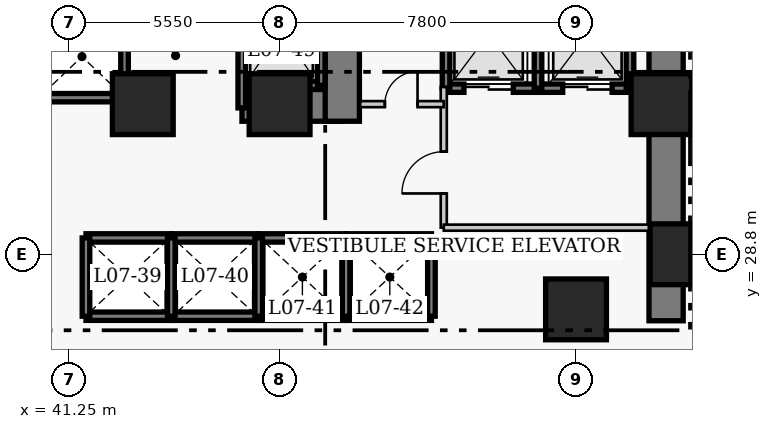
"""IFC4 building model, lengths in metres.
Left out: names, types, materials, properties, quantities, classifications, styles, units other than length and angle.
Written with IfcOpenShell. Run it as: python <this file> out.ifc"""

import sys

from ifc_helpers import new_model, si_unit, direction, frame, frame_2d, origin, origin_2d, place, context, subcontext, project, spatial, rectangle, extrude, element, fill, save


model = new_model("IFC4")
c1 = context("Model", 3, precision=1e-05, world=origin(), true_north=direction((0.0, 1.0)))
c2 = subcontext(c1, "Body", "Model", "MODEL_VIEW")
j1 = project(units=[si_unit("LENGTHUNIT", "METRE"), si_unit("PLANEANGLEUNIT", "RADIAN")], contexts=[c1])
p1 = place(None, origin())
s1 = spatial("IfcSite", under=j1, at=p1, CompositionType="ELEMENT")
p2 = place(p1, origin())
s2 = spatial("IfcBuilding", under=s1, at=p2, CompositionType="ELEMENT")
p3 = place(p2, frame((0.0, 0.0, 33.6)))
s3 = spatial("IfcBuildingStorey", under=s2, at=p3, CompositionType="ELEMENT", Elevation=33.6)
p4 = place(p3, frame((56.97, 27.05, 0.0), z_axis=(0.0, 0.0, 1.0), x_axis=(0.0, 1.0, 0.0)))
e1 = element("IfcWall", 1, at=p4, inside=s3, PredefinedType="SHEAR", context=c2, shape_type="SweptSolid", body=[
    extrude(rectangle(XDim=13.72, YDim=0.9, at=frame_2d((6.86, 0.0))), origin(), (0.0, 0.0, 1.0), 3.8),
])
p5 = place(p3, frame((45.81, 32.75, 0.0), z_axis=(0.0, 0.0, 1.0), x_axis=(1.0, 0.0, 0.0)))
e2 = element("IfcWall", 2, at=p5, inside=s3, PredefinedType="SHEAR", context=c2, shape_type="SweptSolid", body=[
    extrude(rectangle(XDim=2.64, YDim=0.9, at=frame_2d((1.32, 0.0))), origin(), (0.0, 0.0, 1.0), 3.8),
])
p6 = place(p3, frame((48.45, 32.3, 0.0), z_axis=(0.0, 0.0, 1.0), x_axis=(0.0, 1.0, 0.0)))
e3 = element("IfcWall", 3, at=p6, inside=s3, PredefinedType="SHEAR", context=c2, shape_type="SweptSolid", body=[
    extrude(rectangle(XDim=8.02, YDim=0.9, at=frame_2d((4.01, 0.0))), origin(), (0.0, 0.0, 1.0), 3.8),
])
p7 = place(p6, frame((5.9, 0.0, 0.0)))
e4 = element("IfcOpeningElement", 4, at=p7, cuts=e3, PredefinedType="OPENING", context=c2, shape_type="SweptSolid", body=[
    extrude(rectangle(XDim=1.1, YDim=2.15, at=frame_2d((0.55, 1.075))), frame((0.0, 0.46, 0.0), z_axis=(0.0, -1.0, 0.0), x_axis=(1.0, 0.0, 0.0)), (0.0, 0.0, 1.0), 0.92),
])
for number, where, z_axis, x_axis in (
    (5, (57.35, 28.8, 0.0), (0.0, 0.0, 1.0), (1.0, 0.0, 0.0)),
    (6, (43.2, 32.75, 0.0), (0.0, 0.0, 1.0), (1.0, 0.0, 0.0)),
    (7, (46.8, 32.75, 0.0), (0.0, 0.0, 1.0), (1.0, 0.0, 0.0)),
    (8, (54.6, 27.35, 0.0), (0.0, 0.0, 1.0), (1.0, 0.0, 0.0)),
    (9, (56.85, 32.75, 0.0), (0.0, 0.0, 1.0), (1.0, 0.0, 0.0)),
):
    element("IfcColumn", number, at=place(p3, frame(where, z_axis=z_axis, x_axis=x_axis)), inside=s3, PredefinedType="COLUMN", context=c2, shape_type="SweptSolid", body=[
        extrude(rectangle(XDim=1.6, YDim=1.6, at=origin_2d()), origin(), (0.0, 0.0, 1.0), 3.8),
    ])
for number, where, z_axis, x_axis in (
    (10, (41.705, 29.23, 0.0), (0.0, 0.0, 1.0), (1.0, 0.0, 0.0)),
    (11, (41.705, 27.17, 0.0), (0.0, 0.0, 1.0), (1.0, 0.0, 0.0)),
):
    element("IfcWall", number, at=place(p3, frame(where, z_axis=z_axis, x_axis=x_axis)), inside=s3, PredefinedType="SHEAR", context=c2, shape_type="SweptSolid", body=[
        extrude(rectangle(XDim=2.245, YDim=0.22, at=frame_2d((1.123, 0.0))), origin(), (0.0, 0.0, 1.0), 3.8),
    ])
p8 = place(p3, frame((41.705, 27.17, 0.0), z_axis=(0.0, 0.0, 1.0), x_axis=(0.0, 1.0, 0.0)))
e12 = element("IfcWall", 12, at=p8, inside=s3, PredefinedType="SHEAR", context=c2, shape_type="SweptSolid", body=[
    extrude(rectangle(XDim=2.06, YDim=0.2, at=frame_2d((1.03, 0.0))), origin(), (0.0, 0.0, 1.0), 3.8),
])
for number, where, z_axis, x_axis in (
    (13, (43.95, 29.23, 0.0), (0.0, 0.0, 1.0), (1.0, 0.0, 0.0)),
    (14, (43.95, 27.17, 0.0), (0.0, 0.0, 1.0), (1.0, 0.0, 0.0)),
):
    element("IfcWall", number, at=place(p3, frame(where, z_axis=z_axis, x_axis=x_axis)), inside=s3, PredefinedType="SHEAR", context=c2, shape_type="SweptSolid", body=[
        extrude(rectangle(XDim=2.3, YDim=0.22, at=frame_2d((1.15, 0.0))), origin(), (0.0, 0.0, 1.0), 3.8),
    ])
p9 = place(p3, frame((43.95, 27.17, 0.0), z_axis=(0.0, 0.0, 1.0), x_axis=(0.0, 1.0, 0.0)))
e15 = element("IfcWall", 15, at=p9, inside=s3, PredefinedType="SHEAR", context=c2, shape_type="SweptSolid", body=[
    extrude(rectangle(XDim=2.06, YDim=0.2, at=frame_2d((1.03, 0.0))), origin(), (0.0, 0.0, 1.0), 3.8),
])
for number, where, z_axis, x_axis in (
    (16, (46.25, 29.23, 0.0), (0.0, 0.0, 1.0), (1.0, 0.0, 0.0)),
    (17, (46.25, 27.17, 0.0), (0.0, 0.0, 1.0), (1.0, 0.0, 0.0)),
):
    element("IfcWall", number, at=place(p3, frame(where, z_axis=z_axis, x_axis=x_axis)), inside=s3, PredefinedType="SHEAR", context=c2, shape_type="SweptSolid", body=[
        extrude(rectangle(XDim=2.3, YDim=0.22, at=frame_2d((1.15, 0.0))), origin(), (0.0, 0.0, 1.0), 3.8),
    ])
p10 = place(p3, frame((46.25, 27.17, 0.0), z_axis=(0.0, 0.0, 1.0), x_axis=(0.0, 1.0, 0.0)))
e18 = element("IfcWall", 18, at=p10, inside=s3, PredefinedType="SHEAR", context=c2, shape_type="SweptSolid", body=[
    extrude(rectangle(XDim=2.06, YDim=0.2, at=frame_2d((1.03, 0.0))), origin(), (0.0, 0.0, 1.0), 3.8),
])
for number, where, z_axis, x_axis in (
    (19, (48.55, 29.23, 0.0), (0.0, 0.0, 1.0), (1.0, 0.0, 0.0)),
    (20, (48.55, 27.17, 0.0), (0.0, 0.0, 1.0), (1.0, 0.0, 0.0)),
):
    element("IfcWall", number, at=place(p3, frame(where, z_axis=z_axis, x_axis=x_axis)), inside=s3, PredefinedType="SHEAR", context=c2, shape_type="SweptSolid", body=[
        extrude(rectangle(XDim=2.245, YDim=0.22, at=frame_2d((1.123, 0.0))), origin(), (0.0, 0.0, 1.0), 3.8),
    ])
for number, where, z_axis, x_axis in (
    (21, (48.55, 27.17, 0.0), (0.0, 0.0, 1.0), (0.0, 1.0, 0.0)),
    (22, (50.795, 27.17, 0.0), (0.0, 0.0, 1.0), (0.0, 1.0, 0.0)),
):
    element("IfcWall", number, at=place(p3, frame(where, z_axis=z_axis, x_axis=x_axis)), inside=s3, PredefinedType="SHEAR", context=c2, shape_type="SweptSolid", body=[
        extrude(rectangle(XDim=2.06, YDim=0.2, at=frame_2d((1.03, 0.0))), origin(), (0.0, 0.0, 1.0), 3.8),
    ])
p11 = place(p3, frame((40.4, 32.92, 0.0), z_axis=(0.0, 0.0, 1.0), x_axis=(1.0, 0.0, 0.0)))
e23 = element("IfcWall", 23, at=p11, inside=s3, PredefinedType="SHEAR", context=c2, shape_type="SweptSolid", body=[
    extrude(rectangle(XDim=2.32, YDim=0.22, at=frame_2d((1.16, 0.0))), origin(), (0.0, 0.0, 1.0), 3.8),
])
p12 = place(p3, frame((42.72, 32.92, 0.0), z_axis=(0.0, 0.0, 1.0), x_axis=(0.0, 1.0, 0.0)))
e24 = element("IfcWall", 24, at=p12, inside=s3, PredefinedType="SHEAR", context=c2, shape_type="SweptSolid", body=[
    extrude(rectangle(XDim=2.16, YDim=0.2, at=frame_2d((1.08, 0.0))), origin(), (0.0, 0.0, 1.0), 3.8),
])
p13 = place(p3, frame((51.18, 33.17, 0.0), z_axis=(0.0, 0.0, 1.0), x_axis=(1.0, 0.0, 0.0)))
e25 = element("IfcWall", 25, at=p13, inside=s3, PredefinedType="SHEAR", context=c2, shape_type="SweptSolid", body=[
    extrude(rectangle(XDim=2.42, YDim=0.22, at=frame_2d((1.21, 0.0))), origin(), (0.0, 0.0, 1.0), 3.8),
])
p14 = place(p13, frame((0.47, 0.0, 0.0)))
e26 = element("IfcOpeningElement", 26, at=p14, cuts=e25, PredefinedType="OPENING", context=c2, shape_type="SweptSolid", body=[
    extrude(rectangle(XDim=1.3, YDim=2.15, at=frame_2d((0.65, 1.075))), frame((0.0, 0.12, 0.0), z_axis=(0.0, -1.0, 0.0), x_axis=(1.0, 0.0, 0.0)), (0.0, 0.0, 1.0), 0.24),
])
p15 = place(p3, frame((51.18, 33.17, 0.0), z_axis=(0.0, 0.0, 1.0), x_axis=(0.0, 1.0, 0.0)))
e27 = element("IfcWall", 27, at=p15, inside=s3, PredefinedType="SHEAR", context=c2, shape_type="SweptSolid", body=[
    extrude(rectangle(XDim=2.86, YDim=0.2, at=frame_2d((1.43, 0.0))), origin(), (0.0, 0.0, 1.0), 3.8),
])
p16 = place(p3, frame((53.6, 33.17, 0.0), z_axis=(0.0, 0.0, 1.0), x_axis=(1.0, 0.0, 0.0)))
e28 = element("IfcWall", 28, at=p16, inside=s3, PredefinedType="SHEAR", context=c2, shape_type="SweptSolid", body=[
    extrude(rectangle(XDim=2.42, YDim=0.22, at=frame_2d((1.21, 0.0))), origin(), (0.0, 0.0, 1.0), 3.8),
])
p17 = place(p16, frame((0.65, 0.0, 0.0)))
e29 = element("IfcOpeningElement", 29, at=p17, cuts=e28, PredefinedType="OPENING", context=c2, shape_type="SweptSolid", body=[
    extrude(rectangle(XDim=1.3, YDim=2.15, at=frame_2d((0.65, 1.075))), frame((0.0, 0.12, 0.0), z_axis=(0.0, -1.0, 0.0), x_axis=(1.0, 0.0, 0.0)), (0.0, 0.0, 1.0), 0.24),
])
for number, where, z_axis, x_axis in (
    (30, (53.6, 33.17, 0.0), (0.0, 0.0, 1.0), (0.0, 1.0, 0.0)),
    (31, (56.02, 33.17, 0.0), (0.0, 0.0, 1.0), (0.0, 1.0, 0.0)),
):
    element("IfcWall", number, at=place(p3, frame(where, z_axis=z_axis, x_axis=x_axis)), inside=s3, PredefinedType="SHEAR", context=c2, shape_type="SweptSolid", body=[
        extrude(rectangle(XDim=2.86, YDim=0.2, at=frame_2d((1.43, 0.0))), origin(), (0.0, 0.0, 1.0), 3.8),
    ])
p18 = place(p3, frame((45.805, 33.245, 0.0), z_axis=(0.0, 0.0, 1.0), x_axis=(1.0, 0.0, 0.0)))
e32 = element("IfcWall", 32, at=p18, inside=s3, PredefinedType="SHEAR", context=c2, shape_type="SweptSolid", body=[
    extrude(rectangle(XDim=2.09, YDim=0.22, at=frame_2d((1.045, 0.0))), origin(), (0.0, 0.0, 1.0), 3.8),
])
p19 = place(p3, frame((45.805, 32.65, 0.0), z_axis=(0.0, 0.0, 1.0), x_axis=(0.0, 1.0, 0.0)))
e33 = element("IfcWall", 33, at=p19, inside=s3, PredefinedType="SHEAR", context=c2, shape_type="SweptSolid", body=[
    extrude(rectangle(XDim=3.505, YDim=0.2, at=frame_2d((1.752, 0.0))), origin(), (0.0, 0.0, 1.0), 3.8),
])
p20 = place(p3, frame((47.895, 33.245, 0.0), z_axis=(0.0, 0.0, 1.0), x_axis=(0.0, 1.0, 0.0)))
e34 = element("IfcWall", 34, at=p20, inside=s3, PredefinedType="SHEAR", context=c2, shape_type="SweptSolid", body=[
    extrude(rectangle(XDim=2.91, YDim=0.2, at=frame_2d((1.455, 0.0))), origin(), (0.0, 0.0, 1.0), 3.8),
])
p21 = place(p3, frame((51.12, 29.5, 0.0), z_axis=(0.0, 0.0, 1.0), x_axis=(0.0, 1.0, 0.0)))
e35 = element("IfcWall", 35, at=p21, inside=s3, PredefinedType="PARTITIONING", context=c2, shape_type="SweptSolid", body=[
    extrude(rectangle(XDim=3.7, YDim=0.16, at=frame_2d((1.85, 0.0))), origin(), (0.0, 0.0, 1.0), 3.54),
])
p22 = place(p21, frame((0.9, 0.0, 0.0)))
e36 = element("IfcOpeningElement", 36, at=p22, cuts=e35, PredefinedType="OPENING", context=c2, shape_type="SweptSolid", body=[
    extrude(rectangle(XDim=1.1, YDim=2.15, at=frame_2d((0.55, 1.075))), frame((0.0, 0.09, 0.0), z_axis=(0.0, -1.0, 0.0), x_axis=(1.0, 0.0, 0.0)), (0.0, 0.0, 1.0), 0.18),
])
p23 = place(p3, frame((51.12, 29.5, 0.0), z_axis=(0.0, 0.0, 1.0), x_axis=(1.0, 0.0, 0.0)))
e37 = element("IfcWall", 37, at=p23, inside=s3, PredefinedType="PARTITIONING", context=c2, shape_type="SweptSolid", body=[
    extrude(rectangle(XDim=5.63, YDim=0.16, at=frame_2d((2.815, 0.0))), origin(), (0.0, 0.0, 1.0), 3.54),
])
p24 = place(p3, frame((48.92, 32.75, 0.0), z_axis=(0.0, 0.0, 1.0), x_axis=(1.0, 0.0, 0.0)))
e38 = element("IfcWall", 38, at=p24, inside=s3, PredefinedType="PARTITIONING", context=c2, shape_type="SweptSolid", body=[
    extrude(rectangle(XDim=2.2, YDim=0.16, at=frame_2d((1.1, 0.0))), origin(), (0.0, 0.0, 1.0), 3.54),
])
p25 = place(p24, frame((0.65, 0.0, 0.0)))
e39 = element("IfcOpeningElement", 39, at=p25, cuts=e38, PredefinedType="OPENING", context=c2, shape_type="SweptSolid", body=[
    extrude(rectangle(XDim=0.86, YDim=2.05, at=frame_2d((0.43, 1.025))), frame((0.0, 0.09, 0.0), z_axis=(0.0, -1.0, 0.0), x_axis=(1.0, 0.0, 0.0)), (0.0, 0.0, 1.0), 0.18),
])
p26 = place(p14, origin())
e40 = element("IfcDoor", 40, at=p26, inside=s3, OperationType="DOUBLE_DOOR_SLIDING", PredefinedType="DOOR", context=c2, shape_type="SweptSolid", body=[
    extrude(rectangle(XDim=1.3, YDim=2.15, at=frame_2d((0.65, 1.075))), frame((0.0, 0.025, 0.0), z_axis=(0.0, -1.0, 0.0), x_axis=(1.0, 0.0, 0.0)), (0.0, 0.0, 1.0), 0.05),
])
fill(e26, e40)
p27 = place(p17, origin())
e41 = element("IfcDoor", 41, at=p27, inside=s3, OperationType="DOUBLE_DOOR_SLIDING", PredefinedType="DOOR", context=c2, shape_type="SweptSolid", body=[
    extrude(rectangle(XDim=1.3, YDim=2.15, at=frame_2d((0.65, 1.075))), frame((0.0, 0.025, 0.0), z_axis=(0.0, -1.0, 0.0), x_axis=(1.0, 0.0, 0.0)), (0.0, 0.0, 1.0), 0.05),
])
fill(e29, e41)
p28 = place(p22, origin())
e42 = element("IfcDoor", 42, at=p28, inside=s3, OperationType="SINGLE_SWING_LEFT", PredefinedType="DOOR", context=c2, shape_type="SweptSolid", body=[
    extrude(rectangle(XDim=1.1, YDim=2.15, at=frame_2d((0.55, 1.075))), frame((0.0, 0.025, 0.0), z_axis=(0.0, -1.0, 0.0), x_axis=(1.0, 0.0, 0.0)), (0.0, 0.0, 1.0), 0.05),
])
fill(e36, e42)
p29 = place(p25, origin())
e43 = element("IfcDoor", 43, at=p29, inside=s3, OperationType="SINGLE_SWING_RIGHT", PredefinedType="DOOR", context=c2, shape_type="SweptSolid", body=[
    extrude(rectangle(XDim=0.86, YDim=2.05, at=frame_2d((0.43, 1.025))), frame((0.0, 0.025, 0.0), z_axis=(0.0, -1.0, 0.0), x_axis=(1.0, 0.0, 0.0)), (0.0, 0.0, 1.0), 0.05),
])
fill(e39, e43)
save(model, sys.argv[1])
